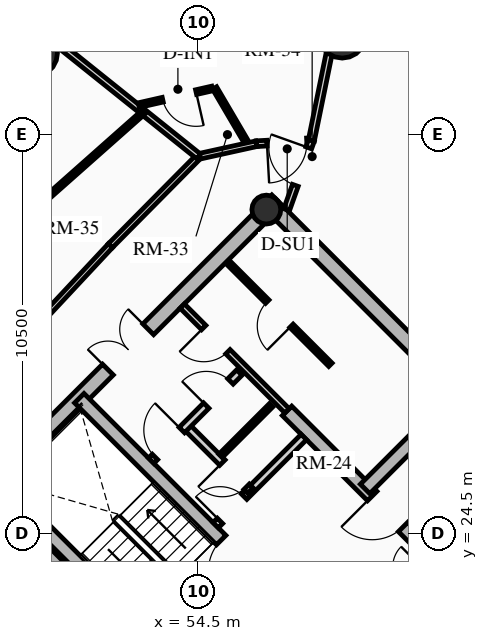
"""IFC4 building model, lengths in metres.
Left out: names, types, materials, properties, quantities, classifications, styles, units other than length and angle.
Written with IfcOpenShell. Run it as: python <this file> out.ifc"""

import sys

from ifc_helpers import new_model, si_unit, direction, frame, frame_2d, origin, origin_2d, place, context, subcontext, project, spatial, rectangle, circle, hollow_circle, extrude, source, transform, mapped, element, fill, save


model = new_model("IFC4")
c1 = context("Model", 3, precision=1e-05, world=origin(), true_north=direction((0.0, 1.0)))
c2 = subcontext(c1, "Body", "Model", "MODEL_VIEW")
j1 = project(units=[si_unit("LENGTHUNIT", "METRE"), si_unit("PLANEANGLEUNIT", "RADIAN")], contexts=[c1])
p1 = place(None, origin())
s1 = spatial("IfcSite", under=j1, at=p1, CompositionType="ELEMENT")
p2 = place(p1, origin())
s2 = spatial("IfcBuilding", under=s1, at=p2, CompositionType="ELEMENT")
p3 = place(p2, frame((0.0, 0.0, 171.97)))
s3 = spatial("IfcBuildingStorey", under=s2, at=p3, CompositionType="ELEMENT", Elevation=171.97)
for number, where, z_axis, x_axis in (
    (1, (58.702, 15.732, 0.0), (0.0, 0.0, 1.0), (-0.707, 0.707, 0.0)),
    (2, (66.268, 23.298, 0.0), (0.0, 0.0, 1.0), (-0.707, 0.707, 0.0)),
):
    element("IfcWall", number, at=place(p3, frame(where, z_axis=z_axis, x_axis=x_axis)), inside=s3, PredefinedType="SHEAR", context=c2, shape_type="SweptSolid", body=[
        extrude(rectangle(XDim=14.1, YDim=0.4, at=frame_2d((7.05, 0.0))), origin(), (0.0, 0.0, 1.0), 2.91),
    ])
p4 = place(p3, frame((48.873, 25.561, 0.0), z_axis=(0.0, 0.0, 1.0), x_axis=(0.707106781187, 0.707106781187, 0.0)))
e3 = element("IfcWall", 3, at=p4, inside=s3, PredefinedType="SHEAR", context=c2, shape_type="SweptSolid", body=[
    extrude(rectangle(XDim=10.7, YDim=0.4, at=frame_2d((5.35, 0.0))), origin(), (0.0, 0.0, 1.0), 2.91),
])
m1 = source(origin(), c2, "Body", "SweptSolid", [
    extrude(rectangle(XDim=1.5, YDim=2.02, at=frame_2d((0.75, 1.01))), frame((0.0, 0.21, 0.0), z_axis=(0.0, -1.0, 0.0), x_axis=(1.0, 0.0, 0.0)), (0.0, 0.0, 1.0), 0.42),
])
p5 = place(p4, frame((4.6, 0.0, 0.0)))
e4 = element("IfcOpeningElement", 4, at=p5, cuts=e3, PredefinedType="OPENING", context=c2, shape_type="MappedRepresentation", body=[
    mapped(m1, transform((0.0, 0.0, 0.0), x_axis=(1.0, 0.0, 0.0), y_axis=(0.0, 1.0, 0.0), z_axis=(0.0, 0.0, 1.0), scale=1.0)),
])
p6 = place(p3, frame((61.06, 18.373, 0.0), z_axis=(0.0, 0.0, 1.0), x_axis=(-0.707106781187, 0.707106781187, 0.0)))
e5 = element("IfcWall", 5, at=p6, inside=s3, PredefinedType="SHEAR", context=c2, shape_type="SweptSolid", body=[
    extrude(rectangle(XDim=13.7, YDim=0.35, at=frame_2d((6.85, 0.0))), origin(), (0.0, 0.0, 1.0), 2.91),
])
m2 = source(origin(), c2, "Body", "SweptSolid", [
    extrude(rectangle(XDim=1.1, YDim=2.015, at=frame_2d((0.55, 1.007))), frame((0.0, 0.185, 0.0), z_axis=(0.0, -1.0, 0.0), x_axis=(1.0, 0.0, 0.0)), (0.0, 0.0, 1.0), 0.37),
])
p7 = place(p6, frame((4.85, 0.0, 0.0)))
e6 = element("IfcOpeningElement", 6, at=p7, cuts=e5, PredefinedType="OPENING", context=c2, shape_type="MappedRepresentation", body=[
    mapped(m2, transform((0.0, 0.0, 0.0), x_axis=(1.0, 0.0, 0.0), y_axis=(0.0, 1.0, 0.0), z_axis=(0.0, 0.0, 1.0), scale=1.0)),
])
p8 = place(p6, frame((0.625, 0.0, 0.0)))
e7 = element("IfcOpeningElement", 7, at=p8, cuts=e5, PredefinedType="OPENING", context=c2, shape_type="MappedRepresentation", body=[
    mapped(m2, transform((0.0, 0.0, 0.0), x_axis=(1.0, 0.0, 0.0), y_axis=(0.0, 1.0, 0.0), z_axis=(0.0, 0.0, 1.0), scale=1.0)),
])
p9 = place(p6, frame((2.625, 0.0, 0.0)))
e8 = element("IfcOpeningElement", 8, at=p9, cuts=e5, PredefinedType="OPENING", context=c2, shape_type="MappedRepresentation", body=[
    mapped(m2, transform((0.0, 0.0, 0.0), x_axis=(1.0, 0.0, 0.0), y_axis=(0.0, 1.0, 0.0), z_axis=(0.0, 0.0, 1.0), scale=1.0)),
])
m3 = source(origin(), c2, "Body", "SweptSolid", [
    extrude(rectangle(XDim=1.15, YDim=2.02, at=frame_2d((0.575, 1.01))), frame((0.0, 0.185, 0.0), z_axis=(0.0, -1.0, 0.0), x_axis=(1.0, 0.0, 0.0)), (0.0, 0.0, 1.0), 0.37),
])
p10 = place(p6, frame((7.27, 0.0, 0.0)))
e9 = element("IfcOpeningElement", 9, at=p10, cuts=e5, PredefinedType="OPENING", context=c2, shape_type="MappedRepresentation", body=[
    mapped(m3, transform((0.0, 0.0, 0.0), x_axis=(1.0, 0.0, 0.0), y_axis=(0.0, 1.0, 0.0), z_axis=(0.0, 0.0, 1.0), scale=1.0)),
])
p11 = place(p3, frame((63.627, 20.94, 0.0), z_axis=(0.0, 0.0, 1.0), x_axis=(-0.707119496762, 0.707094065383, 0.0)))
e10 = element("IfcWall", 10, at=p11, inside=s3, PredefinedType="SHEAR", context=c2, shape_type="SweptSolid", body=[
    extrude(rectangle(XDim=9.6, YDim=0.35, at=frame_2d((4.8, 0.0))), origin(), (0.0, 0.0, 1.0), 2.91),
])
p12 = place(p11, frame((5.28, 0.0, 0.0)))
e11 = element("IfcOpeningElement", 11, at=p12, cuts=e10, PredefinedType="OPENING", context=c2, shape_type="MappedRepresentation", body=[
    mapped(m3, transform((0.0, 0.0, 0.0), x_axis=(1.0, 0.0, 0.0), y_axis=(0.0, 1.0, 0.0), z_axis=(0.0, 0.0, 1.0), scale=1.0)),
])
p13 = place(p3, frame((53.922, 21.141, 0.0), z_axis=(0.0, 0.0, 1.0), x_axis=(-0.707106781187, 0.707106781187, 0.0)))
e12 = element("IfcWall", 12, at=p13, inside=s3, PredefinedType="SHEAR", context=c2, shape_type="SweptSolid", body=[
    extrude(rectangle(XDim=6.695, YDim=0.35, at=frame_2d((3.348, 0.0))), origin(), (0.0, 0.0, 1.0), 2.91),
])
p14 = place(p3, frame((58.893, 25.674, 0.0), z_axis=(0.0, 0.0, 1.0), x_axis=(0.707106781187, 0.707106781187, 0.0)))
e13 = element("IfcWall", 13, at=p14, inside=s3, PredefinedType="SHEAR", context=c2, shape_type="SweptSolid", body=[
    extrude(rectangle(XDim=3.285, YDim=0.35, at=frame_2d((1.643, 0.0))), origin(), (0.0, 0.0, 1.0), 2.91),
])
p15 = place(p3, frame((56.294, 33.024, 0.0), z_axis=(0.0, 0.0, 1.0), x_axis=(0.707106781187, 0.707106781187, 0.0)))
e14 = element("IfcColumn", 14, at=p15, inside=s3, PredefinedType="COLUMN", context=c2, shape_type="SweptSolid", body=[
    extrude(hollow_circle(Radius=0.38, WallThickness=0.032, at=origin_2d()), origin(), (0.0, 0.0, 1.0), 2.91),
])
for number, where, z_axis, x_axis in (
    (15, (58.291, 37.635, 0.0), (0.0, 0.0, 1.0), (1.0, 0.0, 0.0)),
    (16, (50.173, 37.146, 0.0), (0.0, 0.0, 1.0), (1.0, 0.0, 0.0)),
):
    element("IfcColumn", number, at=place(p3, frame(where, z_axis=z_axis, x_axis=x_axis)), inside=s3, PredefinedType="USERDEFINED", context=c2, shape_type="SweptSolid", body=[
        extrude(circle(Radius=0.625, at=origin_2d()), origin(), (0.0, 0.0, 1.0), 2.91),
    ])
p16 = place(p3, frame((58.214, 21.467, 0.0), z_axis=(0.0, 0.0, 1.0), x_axis=(0.707106781187, 0.707106781187, 0.0)))
e17 = element("IfcWall", 17, at=p16, inside=s3, PredefinedType="PARTITIONING", context=c2, shape_type="SweptSolid", body=[
    extrude(rectangle(XDim=3.28, YDim=0.2, at=frame_2d((1.64, 0.0))), origin(), (0.0, 0.0, 1.0), 2.675),
])
m4 = source(origin(), c2, "Body", "SweptSolid", [
    extrude(rectangle(XDim=1.5, YDim=2.02, at=frame_2d((0.75, 1.01))), frame((0.0, 0.11, 0.0), z_axis=(0.0, -1.0, 0.0), x_axis=(1.0, 0.0, 0.0)), (0.0, 0.0, 1.0), 0.22),
])
p17 = place(p16, frame((1.55, 0.0, 0.0)))
e18 = element("IfcOpeningElement", 18, at=p17, cuts=e17, PredefinedType="OPENING", context=c2, shape_type="MappedRepresentation", body=[
    mapped(m4, transform((0.0, 0.0, 0.0), x_axis=(1.0, 0.0, 0.0), y_axis=(0.0, 1.0, 0.0), z_axis=(0.0, 0.0, 1.0), scale=1.0)),
])
p18 = place(p3, frame((54.961, 24.719, 0.0), z_axis=(0.0, 0.0, 1.0), x_axis=(0.707106781187, 0.707106781187, 0.0)))
e19 = element("IfcWall", 19, at=p18, inside=s3, PredefinedType="PARTITIONING", context=c2, shape_type="SweptSolid", body=[
    extrude(rectangle(XDim=3.28, YDim=0.2, at=frame_2d((1.64, 0.0))), origin(), (0.0, 0.0, 1.0), 2.675),
])
m5 = source(origin(), c2, "Body", "SweptSolid", [
    extrude(rectangle(XDim=0.9, YDim=2.005, at=frame_2d((0.45, 1.002))), frame((0.0, 0.11, 0.0), z_axis=(0.0, -1.0, 0.0), x_axis=(1.0, 0.0, 0.0)), (0.0, 0.0, 1.0), 0.22),
])
p19 = place(p18, frame((0.16, 0.0, 0.0)))
e20 = element("IfcOpeningElement", 20, at=p19, cuts=e19, PredefinedType="OPENING", context=c2, shape_type="MappedRepresentation", body=[
    mapped(m5, transform((0.0, 0.0, 0.0), x_axis=(1.0, 0.0, 0.0), y_axis=(0.0, 1.0, 0.0), z_axis=(0.0, 0.0, 1.0), scale=1.0)),
])
p20 = place(p3, frame((55.874, 25.631, 0.0), z_axis=(0.0, 0.0, 1.0), x_axis=(-0.707157639372, 0.707055919343, 0.0)))
e21 = element("IfcWall", 21, at=p20, inside=s3, PredefinedType="PARTITIONING", context=c2, shape_type="SweptSolid", body=[
    extrude(rectangle(XDim=2.4, YDim=0.2, at=frame_2d((1.2, 0.0))), origin(), (0.0, 0.0, 1.0), 2.675),
])
p21 = place(p20, frame((0.14, 0.0, 0.0)))
e22 = element("IfcOpeningElement", 22, at=p21, cuts=e21, PredefinedType="OPENING", context=c2, shape_type="MappedRepresentation", body=[
    mapped(m5, transform((0.0, 0.0, 0.0), x_axis=(1.0, 0.0, 0.0), y_axis=(0.0, 1.0, 0.0), z_axis=(0.0, 0.0, 1.0), scale=1.0)),
])
p22 = place(p3, frame((53.264, 26.416, 0.0), z_axis=(0.0, 0.0, 1.0), x_axis=(0.707106781187, 0.707106781187, 0.0)))
e23 = element("IfcWall", 23, at=p22, inside=s3, PredefinedType="PARTITIONING", context=c2, shape_type="SweptSolid", body=[
    extrude(rectangle(XDim=3.28, YDim=0.2, at=frame_2d((1.64, 0.0))), origin(), (0.0, 0.0, 1.0), 2.675),
])
m6 = source(origin(), c2, "Body", "SweptSolid", [
    extrude(rectangle(XDim=1.0, YDim=2.015, at=frame_2d((0.5, 1.007))), frame((0.0, 0.11, 0.0), z_axis=(0.0, -1.0, 0.0), x_axis=(1.0, 0.0, 0.0)), (0.0, 0.0, 1.0), 0.22),
])
p23 = place(p22, frame((0.14, 0.0, 0.0)))
e24 = element("IfcOpeningElement", 24, at=p23, cuts=e23, PredefinedType="OPENING", context=c2, shape_type="MappedRepresentation", body=[
    mapped(m6, transform((0.0, 0.0, 0.0), x_axis=(1.0, 0.0, 0.0), y_axis=(0.0, 1.0, 0.0), z_axis=(0.0, 0.0, 1.0), scale=1.0)),
])
p24 = place(p22, frame((2.05, 0.0, 0.0)))
e25 = element("IfcOpeningElement", 25, at=p24, cuts=e23, PredefinedType="OPENING", context=c2, shape_type="MappedRepresentation", body=[
    mapped(m5, transform((0.0, 0.0, 0.0), x_axis=(1.0, 0.0, 0.0), y_axis=(0.0, 1.0, 0.0), z_axis=(0.0, 0.0, 1.0), scale=1.0)),
])
p25 = place(p3, frame((55.089, 26.543, 0.0), z_axis=(0.0, 0.0, 1.0), x_axis=(0.707106781187, 0.707106781187, 0.0)))
e26 = element("IfcWall", 26, at=p25, inside=s3, PredefinedType="PARTITIONING", context=c2, shape_type="SweptSolid", body=[
    extrude(rectangle(XDim=1.88, YDim=0.125, at=frame_2d((0.94, 0.0))), origin(), (0.0, 0.0, 1.0), 2.675),
])
p26 = place(p3, frame((56.839, 27.728, 0.0), z_axis=(0.0, 0.0, 1.0), x_axis=(-0.707106781187, 0.707106781187, 0.0)))
e27 = element("IfcWall", 27, at=p26, inside=s3, PredefinedType="PARTITIONING", context=c2, shape_type="SweptSolid", body=[
    extrude(rectangle(XDim=3.9, YDim=0.16, at=frame_2d((1.95, 0.0))), origin(), (0.0, 0.0, 1.0), 2.675),
])
m7 = source(origin(), c2, "Body", "SweptSolid", [
    extrude(rectangle(XDim=0.9, YDim=2.005, at=frame_2d((0.45, 1.002))), frame((0.0, 0.09, 0.0), z_axis=(0.0, -1.0, 0.0), x_axis=(1.0, 0.0, 0.0)), (0.0, 0.0, 1.0), 0.18),
])
p27 = place(p26, frame((2.2, 0.0, 0.0)))
e28 = element("IfcOpeningElement", 28, at=p27, cuts=e27, PredefinedType="OPENING", context=c2, shape_type="MappedRepresentation", body=[
    mapped(m7, transform((0.0, 0.0, 0.0), x_axis=(1.0, 0.0, 0.0), y_axis=(0.0, 1.0, 0.0), z_axis=(0.0, 0.0, 1.0), scale=1.0)),
])
p28 = place(p3, frame((57.981, 28.941, 0.0), z_axis=(0.0, 0.0, 1.0), x_axis=(-0.707074823725, 0.707138737204, 0.0)))
e29 = element("IfcWall", 29, at=p28, inside=s3, PredefinedType="PARTITIONING", context=c2, shape_type="SweptSolid", body=[
    extrude(rectangle(XDim=3.82, YDim=0.125, at=frame_2d((1.91, 0.0))), origin(), (0.0, 0.0, 1.0), 2.675),
])
m8 = source(origin(), c2, "Body", "SweptSolid", [
    extrude(rectangle(XDim=0.9, YDim=2.005, at=frame_2d((0.45, 1.002))), frame((0.0, 0.073, 0.0), z_axis=(0.0, -1.0, 0.0), x_axis=(1.0, 0.0, 0.0)), (0.0, 0.0, 1.0), 0.145),
])
p29 = place(p28, frame((1.45, 0.0, 0.0)))
e30 = element("IfcOpeningElement", 30, at=p29, cuts=e29, PredefinedType="OPENING", context=c2, shape_type="MappedRepresentation", body=[
    mapped(m8, transform((0.0, 0.0, 0.0), x_axis=(1.0, 0.0, 0.0), y_axis=(0.0, 1.0, 0.0), z_axis=(0.0, 0.0, 1.0), scale=1.0)),
])
p30 = place(p3, frame((57.478, 34.838, 0.0), z_axis=(0.0, 0.0, 1.0), x_axis=(-0.998448388303, -0.05568497011, 0.0)))
e31 = element("IfcWall", 31, at=p30, inside=s3, PredefinedType="PARTITIONING", context=c2, shape_type="SweptSolid", body=[
    extrude(rectangle(XDim=1.447, YDim=0.15, at=frame_2d((0.723, 0.0))), origin(), (0.0, 0.0, 1.0), 2.245),
])
m9 = source(origin(), c2, "Body", "SweptSolid", [
    extrude(rectangle(XDim=1.05, YDim=2.015, at=frame_2d((0.525, 1.007))), frame((0.0, 0.085, 0.0), z_axis=(0.0, -1.0, 0.0), x_axis=(1.0, 0.0, 0.0)), (0.0, 0.0, 1.0), 0.17),
])
p31 = place(p30, frame((0.12, 0.0, 0.0)))
e32 = element("IfcOpeningElement", 32, at=p31, cuts=e31, PredefinedType="OPENING", context=c2, shape_type="MappedRepresentation", body=[
    mapped(m9, transform((0.0, 0.0, 0.0), x_axis=(1.0, 0.0, 0.0), y_axis=(0.0, 1.0, 0.0), z_axis=(0.0, 0.0, 1.0), scale=1.0)),
])
p32 = place(p3, frame((56.033, 34.757, 0.0), z_axis=(0.0, 0.0, 1.0), x_axis=(-0.976507263775, -0.215484486204, 0.0)))
e33 = element("IfcWall", 33, at=p32, inside=s3, PredefinedType="PARTITIONING", context=c2, shape_type="SweptSolid", body=[
    extrude(rectangle(XDim=1.556, YDim=0.15, at=frame_2d((0.778, 0.0))), origin(), (0.0, 0.0, 1.0), 2.245),
])
p33 = place(p3, frame((54.514, 34.422, 0.0), z_axis=(0.0, 0.0, 1.0), x_axis=(-0.703289573518, -0.710903492593, 0.0)))
e34 = element("IfcWall", 34, at=p33, inside=s3, PredefinedType="PARTITIONING", context=c2, shape_type="SweptSolid", body=[
    extrude(rectangle(XDim=3.303, YDim=0.15, at=frame_2d((1.651, 0.0))), origin(), (0.0, 0.0, 1.0), 2.245),
])
p34 = place(p3, frame((52.191, 32.074, 0.0), z_axis=(0.0, 0.0, 1.0), x_axis=(-0.682404362608, -0.730974887321, 0.0)))
e35 = element("IfcWall", 35, at=p34, inside=s3, PredefinedType="PARTITIONING", context=c2, shape_type="SweptSolid", body=[
    extrude(rectangle(XDim=6.364, YDim=0.15, at=frame_2d((3.182, 0.0))), origin(), (0.0, 0.0, 1.0), 2.245),
])
p35 = place(p3, frame((57.478, 34.838, 0.0), z_axis=(0.0, 0.0, 1.0), x_axis=(0.200272806445, 0.979740171167, 0.0)))
e36 = element("IfcWall", 36, at=p35, inside=s3, PredefinedType="PARTITIONING", context=c2, shape_type="SweptSolid", body=[
    extrude(rectangle(XDim=4.358, YDim=0.16, at=frame_2d((2.179, 0.0))), origin(), (0.0, 0.0, 1.0), 2.245),
])
p36 = place(p3, frame((54.514, 34.422, 0.0), z_axis=(0.0, 0.0, 1.0), x_axis=(-0.780385234796, 0.625299036712, 0.0)))
e37 = element("IfcWall", 37, at=p36, inside=s3, PredefinedType="PARTITIONING", context=c2, shape_type="SweptSolid", body=[
    extrude(rectangle(XDim=6.653, YDim=0.16, at=frame_2d((3.326, 0.0))), origin(), (0.0, 0.0, 1.0), 2.245),
])
p37 = place(p3, frame((56.828, 33.021, 0.0), z_axis=(0.0, 0.0, 1.0), x_axis=(0.336608838259, 0.941644566705, 0.0)))
e38 = element("IfcWall", 38, at=p37, inside=s3, PredefinedType="PARTITIONING", context=c2, shape_type="SweptSolid", body=[
    extrude(rectangle(XDim=1.93, YDim=0.16, at=frame_2d((0.965, 0.0))), origin(), (0.0, 0.0, 1.0), 2.245),
])
m10 = source(origin(), c2, "Body", "SweptSolid", [
    extrude(rectangle(XDim=1.05, YDim=2.015, at=frame_2d((0.525, 1.007))), frame((0.0, 0.09, 0.0), z_axis=(0.0, -1.0, 0.0), x_axis=(1.0, 0.0, 0.0)), (0.0, 0.0, 1.0), 0.18),
])
p38 = place(p37, frame((0.68, 0.0, 0.0)))
e39 = element("IfcOpeningElement", 39, at=p38, cuts=e38, PredefinedType="OPENING", context=c2, shape_type="MappedRepresentation", body=[
    mapped(m10, transform((0.0, 0.0, 0.0), x_axis=(1.0, 0.0, 0.0), y_axis=(0.0, 1.0, 0.0), z_axis=(0.0, 0.0, 1.0), scale=1.0)),
])
p39 = place(p3, frame((55.737, 34.853, 0.0), z_axis=(0.0, 0.0, 1.0), x_axis=(-0.506282425857, 0.862367732043, 0.0)))
e40 = element("IfcWall", 40, at=p39, inside=s3, PredefinedType="PARTITIONING", context=c2, shape_type="SweptSolid", body=[
    extrude(rectangle(XDim=1.591, YDim=0.125, at=frame_2d((0.796, 0.0))), origin(), (0.0, 0.0, 1.0), 2.245),
])
p40 = place(p3, frame((54.871, 36.211, 0.0), z_axis=(0.0, 0.0, 1.0), x_axis=(-0.975212623293, -0.221269833846, 0.0)))
e41 = element("IfcWall", 41, at=p40, inside=s3, PredefinedType="PARTITIONING", context=c2, shape_type="SweptSolid", body=[
    extrude(rectangle(XDim=1.983, YDim=0.125, at=frame_2d((0.991, 0.0))), origin(), (0.0, 0.0, 1.0), 2.675),
])
p41 = place(p40, frame((0.436, 0.0, 0.0)))
e42 = element("IfcOpeningElement", 42, at=p41, cuts=e41, PredefinedType="OPENING", context=c2, shape_type="MappedRepresentation", body=[
    mapped(m8, transform((0.0, 0.0, 0.0), x_axis=(1.0, 0.0, 0.0), y_axis=(0.0, 1.0, 0.0), z_axis=(0.0, 0.0, 1.0), scale=1.0)),
])
p42 = place(p3, frame((53.06, 35.587, 0.0), z_axis=(0.0, 0.0, 1.0), x_axis=(-0.748390346028, -0.663258539314, 0.0)))
e43 = element("IfcWall", 43, at=p42, inside=s3, PredefinedType="PARTITIONING", context=c2, shape_type="SweptSolid", body=[
    extrude(rectangle(XDim=3.553, YDim=0.125, at=frame_2d((1.777, 0.0))), origin(), (0.0, 0.0, 1.0), 2.245),
])
m11 = source(origin(), c2, "Body", "SweptSolid", [
    extrude(rectangle(XDim=1.15, YDim=2.02, at=frame_2d((0.575, 1.01))), frame((0.0, 0.025, 0.0), z_axis=(0.0, -1.0, 0.0), x_axis=(1.0, 0.0, 0.0)), (0.0, 0.0, 1.0), 0.05),
])
p43 = place(p10, origin())
e44 = element("IfcDoor", 44, at=p43, inside=s3, OperationType="SINGLE_SWING_LEFT", PredefinedType="DOOR", context=c2, shape_type="MappedRepresentation", body=[
    mapped(m11, transform((0.0, 0.0, 0.0), x_axis=(1.0, 0.0, 0.0), y_axis=(0.0, 1.0, 0.0), z_axis=(0.0, 0.0, 1.0), scale=1.0)),
])
fill(e9, e44)
p44 = place(p12, origin())
e45 = element("IfcDoor", 45, at=p44, inside=s3, OperationType="SINGLE_SWING_RIGHT", PredefinedType="DOOR", context=c2, shape_type="MappedRepresentation", body=[
    mapped(m11, transform((0.0, 0.0, 0.0), x_axis=(1.0, 0.0, 0.0), y_axis=(0.0, 1.0, 0.0), z_axis=(0.0, 0.0, 1.0), scale=1.0)),
])
fill(e11, e45)
m12 = source(origin(), c2, "Body", "SweptSolid", [
    extrude(rectangle(XDim=1.5, YDim=2.02, at=frame_2d((0.75, 1.01))), frame((0.0, 0.025, 0.0), z_axis=(0.0, -1.0, 0.0), x_axis=(1.0, 0.0, 0.0)), (0.0, 0.0, 1.0), 0.05),
])
p45 = place(p5, origin())
e46 = element("IfcDoor", 46, at=p45, inside=s3, OperationType="DOUBLE_DOOR_SINGLE_SWING", PredefinedType="DOOR", context=c2, shape_type="MappedRepresentation", body=[
    mapped(m12, transform((0.0, 0.0, 0.0), x_axis=(1.0, 0.0, 0.0), y_axis=(0.0, 1.0, 0.0), z_axis=(0.0, 0.0, 1.0), scale=1.0)),
])
fill(e4, e46)
m13 = source(origin(), c2, "Body", "SweptSolid", [
    extrude(rectangle(XDim=0.9, YDim=2.005, at=frame_2d((0.45, 1.002))), frame((0.0, 0.025, 0.0), z_axis=(0.0, -1.0, 0.0), x_axis=(1.0, 0.0, 0.0)), (0.0, 0.0, 1.0), 0.05),
])
p46 = place(p19, origin())
e47 = element("IfcDoor", 47, at=p46, inside=s3, OperationType="SINGLE_SWING_LEFT", PredefinedType="DOOR", context=c2, shape_type="MappedRepresentation", body=[
    mapped(m13, transform((0.0, 0.0, 0.0), x_axis=(1.0, 0.0, 0.0), y_axis=(0.0, 1.0, 0.0), z_axis=(0.0, 0.0, 1.0), scale=1.0)),
])
fill(e20, e47)
m14 = source(origin(), c2, "Body", "SweptSolid", [
    extrude(rectangle(XDim=1.0, YDim=2.015, at=frame_2d((0.5, 1.007))), frame((0.0, 0.025, 0.0), z_axis=(0.0, -1.0, 0.0), x_axis=(1.0, 0.0, 0.0)), (0.0, 0.0, 1.0), 0.05),
])
p47 = place(p23, origin())
e48 = element("IfcDoor", 48, at=p47, inside=s3, OperationType="SINGLE_SWING_RIGHT", PredefinedType="DOOR", context=c2, shape_type="MappedRepresentation", body=[
    mapped(m14, transform((0.0, 0.0, 0.0), x_axis=(1.0, 0.0, 0.0), y_axis=(0.0, 1.0, 0.0), z_axis=(0.0, 0.0, 1.0), scale=1.0)),
])
fill(e24, e48)
p48 = place(p21, origin())
e49 = element("IfcDoor", 49, at=p48, inside=s3, OperationType="SINGLE_SWING_RIGHT", PredefinedType="DOOR", context=c2, shape_type="MappedRepresentation", body=[
    mapped(m13, transform((0.0, 0.0, 0.0), x_axis=(1.0, 0.0, 0.0), y_axis=(0.0, 1.0, 0.0), z_axis=(0.0, 0.0, 1.0), scale=1.0)),
])
fill(e22, e49)
p49 = place(p24, origin())
e50 = element("IfcDoor", 50, at=p49, inside=s3, OperationType="SINGLE_SWING_LEFT", PredefinedType="DOOR", context=c2, shape_type="MappedRepresentation", body=[
    mapped(m13, transform((0.0, 0.0, 0.0), x_axis=(1.0, 0.0, 0.0), y_axis=(0.0, 1.0, 0.0), z_axis=(0.0, 0.0, 1.0), scale=1.0)),
])
fill(e25, e50)
p50 = place(p27, origin())
e51 = element("IfcDoor", 51, at=p50, inside=s3, OperationType="SINGLE_SWING_RIGHT", PredefinedType="DOOR", context=c2, shape_type="MappedRepresentation", body=[
    mapped(m13, transform((0.0, 0.0, 0.0), x_axis=(1.0, 0.0, 0.0), y_axis=(0.0, 1.0, 0.0), z_axis=(0.0, 0.0, 1.0), scale=1.0)),
])
fill(e28, e51)
p51 = place(p29, origin())
e52 = element("IfcDoor", 52, at=p51, inside=s3, OperationType="SINGLE_SWING_LEFT", PredefinedType="DOOR", context=c2, shape_type="MappedRepresentation", body=[
    mapped(m13, transform((0.0, 0.0, 0.0), x_axis=(1.0, 0.0, 0.0), y_axis=(0.0, 1.0, 0.0), z_axis=(0.0, 0.0, 1.0), scale=1.0)),
])
fill(e30, e52)
m15 = source(origin(), c2, "Body", "SweptSolid", [
    extrude(rectangle(XDim=1.05, YDim=2.015, at=frame_2d((0.525, 1.007))), frame((0.0, 0.025, 0.0), z_axis=(0.0, -1.0, 0.0), x_axis=(1.0, 0.0, 0.0)), (0.0, 0.0, 1.0), 0.05),
])
p52 = place(p38, origin())
e53 = element("IfcDoor", 53, at=p52, inside=s3, OperationType="SINGLE_SWING_RIGHT", PredefinedType="DOOR", context=c2, shape_type="MappedRepresentation", body=[
    mapped(m15, transform((0.0, 0.0, 0.0), x_axis=(1.0, 0.0, 0.0), y_axis=(0.0, 1.0, 0.0), z_axis=(0.0, 0.0, 1.0), scale=1.0)),
])
fill(e39, e53)
p53 = place(p31, origin())
e54 = element("IfcDoor", 54, at=p53, inside=s3, OperationType="SINGLE_SWING_RIGHT", PredefinedType="DOOR", context=c2, shape_type="MappedRepresentation", body=[
    mapped(m15, transform((0.0, 0.0, 0.0), x_axis=(1.0, 0.0, 0.0), y_axis=(0.0, 1.0, 0.0), z_axis=(0.0, 0.0, 1.0), scale=1.0)),
])
fill(e32, e54)
p54 = place(p41, origin())
e55 = element("IfcDoor", 55, at=p54, inside=s3, OperationType="SINGLE_SWING_LEFT", PredefinedType="DOOR", context=c2, shape_type="MappedRepresentation", body=[
    mapped(m13, transform((0.0, 0.0, 0.0), x_axis=(1.0, 0.0, 0.0), y_axis=(0.0, 1.0, 0.0), z_axis=(0.0, 0.0, 1.0), scale=1.0)),
])
fill(e42, e55)
save(model, sys.argv[1])
